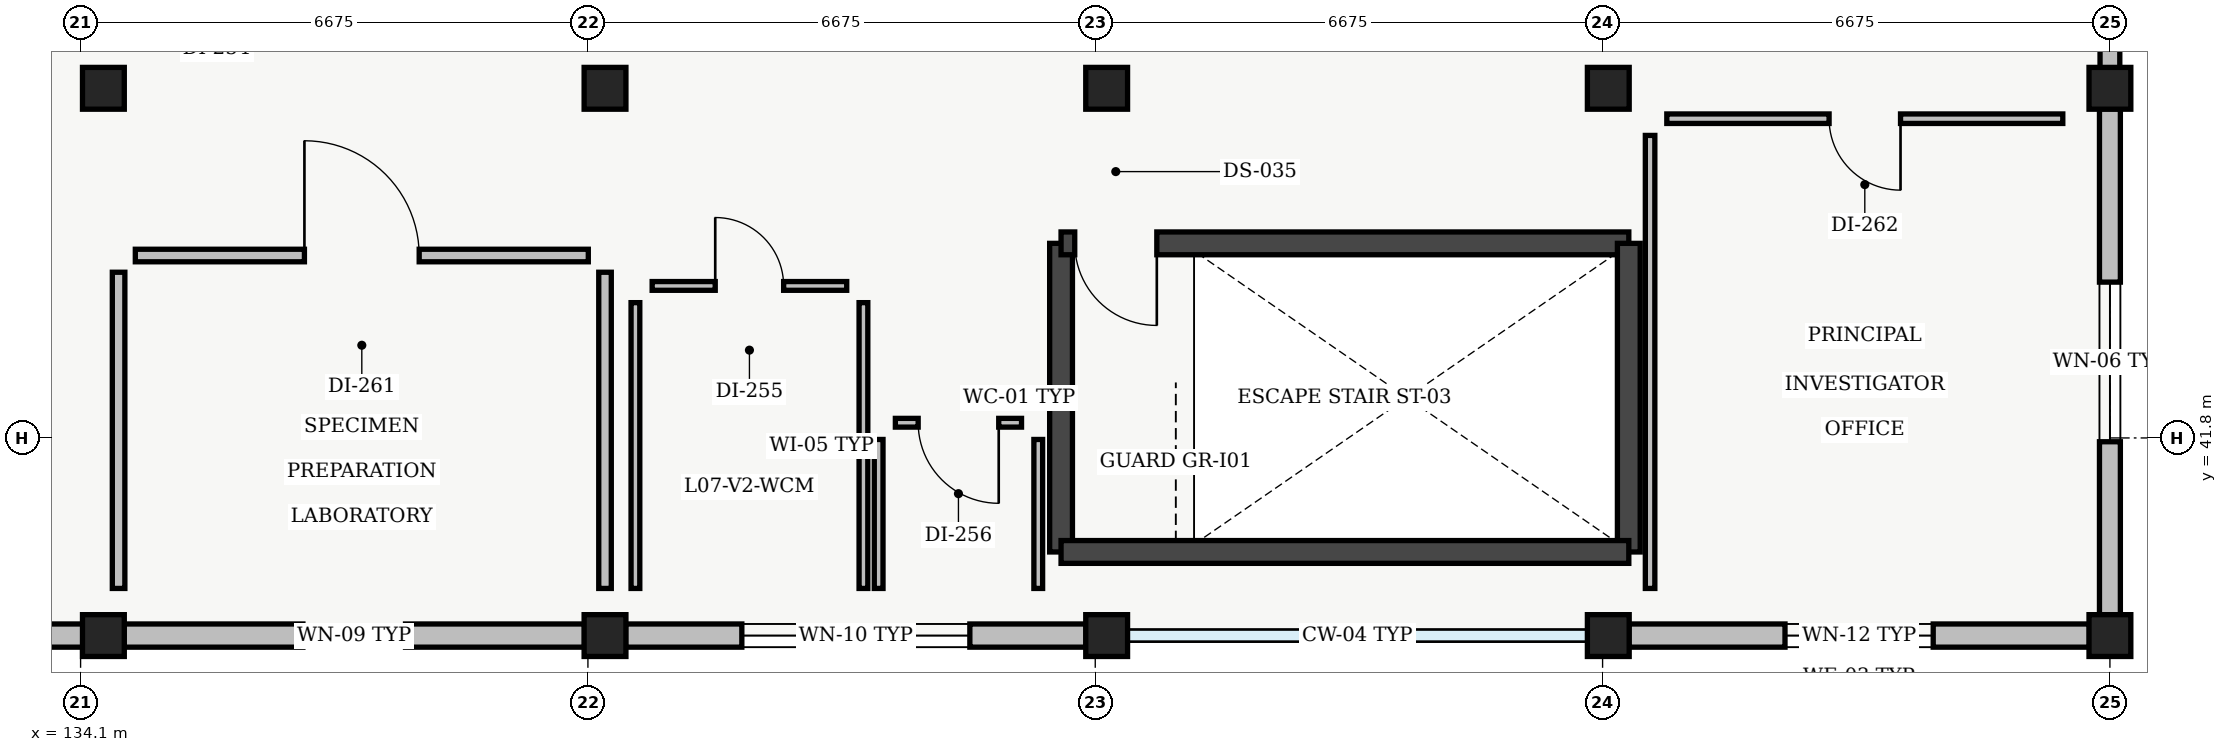
"""IFC4 building model, lengths in metres.
Left out: names, types, materials, properties, quantities, classifications, styles, units other than length and angle.
Written with IfcOpenShell. Run it as: python <this file> out.ifc"""

import sys

from ifc_helpers import new_model, si_unit, direction, frame, frame_2d, origin, origin_2d, place, context, subcontext, project, spatial, rectangle, extrude, element, fill, save


model = new_model("IFC4")
c1 = context("Model", 3, precision=1e-05, world=origin(), true_north=direction((0.0, 1.0)))
c2 = subcontext(c1, "Body", "Model", "MODEL_VIEW")
j1 = project(units=[si_unit("LENGTHUNIT", "METRE"), si_unit("PLANEANGLEUNIT", "RADIAN")], contexts=[c1])
p1 = place(None, origin())
s1 = spatial("IfcSite", under=j1, at=p1, CompositionType="ELEMENT")
p2 = place(p1, origin())
s2 = spatial("IfcBuilding", under=s1, at=p2, CompositionType="ELEMENT")
p3 = place(p2, frame((0.0, 0.0, 32.1)))
s3 = spatial("IfcBuildingStorey", under=s2, at=p3, CompositionType="ELEMENT", Elevation=32.1)
for number, where, z_axis, x_axis in (
    (1, (134.4, 39.2, 0.0), (0.0, 0.0, 1.0), (1.0, 0.0, 0.0)),
    (2, (134.4, 46.4, 0.0), (0.0, 0.0, 1.0), (1.0, 0.0, 0.0)),
    (3, (141.0, 39.2, 0.0), (0.0, 0.0, 1.0), (1.0, 0.0, 0.0)),
    (4, (141.0, 46.4, 0.0), (0.0, 0.0, 1.0), (1.0, 0.0, 0.0)),
    (5, (147.6, 39.2, 0.0), (0.0, 0.0, 1.0), (1.0, 0.0, 0.0)),
    (6, (147.6, 46.4, 0.0), (0.0, 0.0, 1.0), (1.0, 0.0, 0.0)),
    (7, (154.2, 39.2, 0.0), (0.0, 0.0, 1.0), (1.0, 0.0, 0.0)),
    (8, (154.2, 46.4, 0.0), (0.0, 0.0, 1.0), (1.0, 0.0, 0.0)),
    (9, (160.8, 39.2, 0.0), (0.0, 0.0, 1.0), (1.0, 0.0, 0.0)),
    (10, (160.8, 46.4, 0.0), (0.0, 0.0, 1.0), (1.0, 0.0, 0.0)),
):
    element("IfcColumn", number, at=place(p3, frame(where, z_axis=z_axis, x_axis=x_axis)), inside=s3, PredefinedType="COLUMN", context=c2, shape_type="SweptSolid", body=[
        extrude(rectangle(XDim=0.55, YDim=0.55, at=origin_2d()), origin(), (0.0, 0.0, 1.0), 4.305),
    ])
p4 = place(p3, frame((160.8, 53.33, 0.0), z_axis=(0.0, 0.0, 1.0), x_axis=(0.0, -1.0, 0.0)))
e11 = element("IfcWall", 11, at=p4, inside=s3, PredefinedType="STANDARD", context=c2, shape_type="SweptSolid", body=[
    extrude(rectangle(XDim=6.66, YDim=0.26, at=frame_2d((3.33, 0.0))), origin(), (0.0, 0.0, 1.0), 3.79),
])
p5 = place(p4, frame((1.98, 0.0, 0.95)))
e12 = element("IfcOpeningElement", 12, at=p5, cuts=e11, PredefinedType="OPENING", context=c2, shape_type="SweptSolid", body=[
    extrude(rectangle(XDim=2.7, YDim=1.8, at=frame_2d((1.35, 0.9))), frame((0.0, 0.13, 0.0), z_axis=(0.0, -1.0, 0.0), x_axis=(1.0, 0.0, 0.0)), (0.0, 0.0, 1.0), 0.26),
])
p6 = place(p3, frame((160.8, 46.13, 0.0), z_axis=(0.0, 0.0, 1.0), x_axis=(0.0, -1.0, 0.0)))
e13 = element("IfcWall", 13, at=p6, inside=s3, PredefinedType="STANDARD", context=c2, shape_type="SweptSolid", body=[
    extrude(rectangle(XDim=6.66, YDim=0.275, at=frame_2d((3.33, 0.0))), origin(), (0.0, 0.0, 1.0), 3.79),
])
p7 = place(p6, frame((2.28, 0.0, 0.95)))
e14 = element("IfcOpeningElement", 14, at=p7, cuts=e13, PredefinedType="OPENING", context=c2, shape_type="SweptSolid", body=[
    extrude(rectangle(XDim=2.1, YDim=1.8, at=frame_2d((1.05, 0.9))), frame((0.0, 0.137, 0.0), z_axis=(0.0, -1.0, 0.0), x_axis=(1.0, 0.0, 0.0)), (0.0, 0.0, 1.0), 0.275),
])
p8 = place(p3, frame((160.53, 39.2, 0.0), z_axis=(0.0, 0.0, 1.0), x_axis=(-1.0, 0.0, 0.0)))
e15 = element("IfcWall", 15, at=p8, inside=s3, PredefinedType="STANDARD", context=c2, shape_type="SweptSolid", body=[
    extrude(rectangle(XDim=6.06, YDim=0.305, at=frame_2d((3.03, 0.0))), origin(), (0.0, 0.0, 1.0), 3.79),
])
p9 = place(p8, frame((2.055, 0.0, 0.95)))
e16 = element("IfcOpeningElement", 16, at=p9, cuts=e15, PredefinedType="OPENING", context=c2, shape_type="SweptSolid", body=[
    extrude(rectangle(XDim=1.95, YDim=1.5, at=frame_2d((0.975, 0.75))), frame((0.0, 0.152, 0.0), z_axis=(0.0, -1.0, 0.0), x_axis=(1.0, 0.0, 0.0)), (0.0, 0.0, 1.0), 0.305),
])
p10 = place(p3, frame((147.33, 39.2, 0.0), z_axis=(0.0, 0.0, 1.0), x_axis=(-1.0, 0.0, 0.0)))
e17 = element("IfcWall", 17, at=p10, inside=s3, PredefinedType="STANDARD", context=c2, shape_type="SweptSolid", body=[
    extrude(rectangle(XDim=6.06, YDim=0.305, at=frame_2d((3.03, 0.0))), origin(), (0.0, 0.0, 1.0), 3.79),
])
p11 = place(p10, frame((1.53, 0.0, 0.95)))
e18 = element("IfcOpeningElement", 18, at=p11, cuts=e17, PredefinedType="OPENING", context=c2, shape_type="SweptSolid", body=[
    extrude(rectangle(XDim=3.0, YDim=1.65, at=frame_2d((1.5, 0.825))), frame((0.0, 0.152, 0.0), z_axis=(0.0, -1.0, 0.0), x_axis=(1.0, 0.0, 0.0)), (0.0, 0.0, 1.0), 0.305),
])
p12 = place(p3, frame((140.73, 39.2, 0.0), z_axis=(0.0, 0.0, 1.0), x_axis=(-1.0, 0.0, 0.0)))
e19 = element("IfcWall", 19, at=p12, inside=s3, PredefinedType="STANDARD", context=c2, shape_type="SweptSolid", body=[
    extrude(rectangle(XDim=6.06, YDim=0.305, at=frame_2d((3.03, 0.0))), origin(), (0.0, 0.0, 1.0), 3.79),
])
p13 = place(p12, frame((2.355, 0.0, 0.95)))
e20 = element("IfcOpeningElement", 20, at=p13, cuts=e19, PredefinedType="OPENING", context=c2, shape_type="SweptSolid", body=[
    extrude(rectangle(XDim=1.35, YDim=1.8, at=frame_2d((0.675, 0.9))), frame((0.0, 0.152, 0.0), z_axis=(0.0, -1.0, 0.0), x_axis=(1.0, 0.0, 0.0)), (0.0, 0.0, 1.0), 0.305),
])
p14 = place(p3, frame((134.13, 39.2, 0.0), z_axis=(0.0, 0.0, 1.0), x_axis=(-1.0, 0.0, 0.0)))
e21 = element("IfcWall", 21, at=p14, inside=s3, PredefinedType="STANDARD", context=c2, shape_type="SweptSolid", body=[
    extrude(rectangle(XDim=6.06, YDim=0.305, at=frame_2d((3.03, 0.0))), origin(), (0.0, 0.0, 1.0), 3.79),
])
p15 = place(p3, frame((147.0, 40.3, 0.0), z_axis=(0.0, 0.0, 1.0), x_axis=(0.0, 1.0, 0.0)))
e22 = element("IfcWall", 22, at=p15, inside=s3, PredefinedType="SHEAR", context=c2, shape_type="SweptSolid", body=[
    extrude(rectangle(XDim=4.06, YDim=0.3, at=frame_2d((2.03, 0.0))), origin(), (0.0, 0.0, 1.0), 4.28),
])
p16 = place(p3, frame((147.0, 44.36, 0.0), z_axis=(0.0, 0.0, 1.0), x_axis=(1.0, 0.0, 0.0)))
e23 = element("IfcWall", 23, at=p16, inside=s3, PredefinedType="SHEAR", context=c2, shape_type="SweptSolid", body=[
    extrude(rectangle(XDim=7.47, YDim=0.3, at=frame_2d((3.735, 0.0))), origin(), (0.0, 0.0, 1.0), 4.28),
])
p17 = place(p16, frame((0.18, 0.0, 0.0)))
e24 = element("IfcOpeningElement", 24, at=p17, cuts=e23, PredefinedType="OPENING", context=c2, shape_type="SweptSolid", body=[
    extrude(rectangle(XDim=1.08, YDim=2.15, at=frame_2d((0.54, 1.075))), frame((0.0, 0.15, 0.0), z_axis=(0.0, -1.0, 0.0), x_axis=(1.0, 0.0, 0.0)), (0.0, 0.0, 1.0), 0.3),
])
p18 = place(p3, frame((154.47, 44.36, 0.0), z_axis=(0.0, 0.0, 1.0), x_axis=(0.0, -1.0, 0.0)))
e25 = element("IfcWall", 25, at=p18, inside=s3, PredefinedType="SHEAR", context=c2, shape_type="SweptSolid", body=[
    extrude(rectangle(XDim=4.06, YDim=0.3, at=frame_2d((2.03, 0.0))), origin(), (0.0, 0.0, 1.0), 4.28),
])
p19 = place(p3, frame((154.47, 40.3, 0.0), z_axis=(0.0, 0.0, 1.0), x_axis=(-1.0, 0.0, 0.0)))
e26 = element("IfcWall", 26, at=p19, inside=s3, PredefinedType="SHEAR", context=c2, shape_type="SweptSolid", body=[
    extrude(rectangle(XDim=7.47, YDim=0.3, at=frame_2d((3.735, 0.0))), origin(), (0.0, 0.0, 1.0), 4.28),
])
p20 = place(p3, frame((144.4, 39.82, 0.0), z_axis=(0.0, 0.0, 1.0), x_axis=(0.0, 1.0, 0.0)))
e27 = element("IfcWall", 27, at=p20, inside=s3, PredefinedType="PARTITIONING", context=c2, shape_type="SweptSolid", body=[
    extrude(rectangle(XDim=3.76, YDim=0.115, at=frame_2d((1.88, 0.0))), origin(), (0.0, 0.0, 1.0), 3.95),
])
p21 = place(p3, frame((144.18, 43.8, 0.0), z_axis=(0.0, 0.0, 1.0), x_axis=(-1.0, 0.0, 0.0)))
e28 = element("IfcWall", 28, at=p21, inside=s3, PredefinedType="PARTITIONING", context=c2, shape_type="SweptSolid", body=[
    extrude(rectangle(XDim=2.56, YDim=0.115, at=frame_2d((1.28, 0.0))), origin(), (0.0, 0.0, 1.0), 3.95),
])
p22 = place(p21, frame((0.83, 0.0, 0.0)))
e29 = element("IfcOpeningElement", 29, at=p22, cuts=e28, PredefinedType="OPENING", context=c2, shape_type="SweptSolid", body=[
    extrude(rectangle(XDim=0.9, YDim=2.1, at=frame_2d((0.45, 1.05))), frame((0.0, 0.058, 0.0), z_axis=(0.0, -1.0, 0.0), x_axis=(1.0, 0.0, 0.0)), (0.0, 0.0, 1.0), 0.115),
])
p23 = place(p3, frame((141.4, 43.58, 0.0), z_axis=(0.0, 0.0, 1.0), x_axis=(0.0, -1.0, 0.0)))
e30 = element("IfcWall", 30, at=p23, inside=s3, PredefinedType="PARTITIONING", context=c2, shape_type="SweptSolid", body=[
    extrude(rectangle(XDim=3.76, YDim=0.115, at=frame_2d((1.88, 0.0))), origin(), (0.0, 0.0, 1.0), 3.95),
])
p24 = place(p3, frame((146.7, 39.82, 0.0), z_axis=(0.0, 0.0, 1.0), x_axis=(0.0, 1.0, 0.0)))
e31 = element("IfcWall", 31, at=p24, inside=s3, PredefinedType="PARTITIONING", context=c2, shape_type="SweptSolid", body=[
    extrude(rectangle(XDim=1.96, YDim=0.115, at=frame_2d((0.98, 0.0))), origin(), (0.0, 0.0, 1.0), 3.95),
])
p25 = place(p3, frame((146.48, 42.0, 0.0), z_axis=(0.0, 0.0, 1.0), x_axis=(-1.0, 0.0, 0.0)))
e32 = element("IfcWall", 32, at=p25, inside=s3, PredefinedType="PARTITIONING", context=c2, shape_type="SweptSolid", body=[
    extrude(rectangle(XDim=1.66, YDim=0.115, at=frame_2d((0.83, 0.0))), origin(), (0.0, 0.0, 1.0), 3.95),
])
p26 = place(p25, frame((0.3, 0.0, 0.0)))
e33 = element("IfcOpeningElement", 33, at=p26, cuts=e32, PredefinedType="OPENING", context=c2, shape_type="SweptSolid", body=[
    extrude(rectangle(XDim=1.06, YDim=2.12, at=frame_2d((0.53, 1.06))), frame((0.0, 0.058, 0.0), z_axis=(0.0, -1.0, 0.0), x_axis=(1.0, 0.0, 0.0)), (0.0, 0.0, 1.0), 0.115),
])
p27 = place(p3, frame((144.6, 41.78, 0.0), z_axis=(0.0, 0.0, 1.0), x_axis=(0.0, -1.0, 0.0)))
e34 = element("IfcWall", 34, at=p27, inside=s3, PredefinedType="PARTITIONING", context=c2, shape_type="SweptSolid", body=[
    extrude(rectangle(XDim=1.96, YDim=0.115, at=frame_2d((0.98, 0.0))), origin(), (0.0, 0.0, 1.0), 3.95),
])
p28 = place(p3, frame((141.0, 39.82, 0.0), z_axis=(0.0, 0.0, 1.0), x_axis=(0.0, 1.0, 0.0)))
e35 = element("IfcWall", 35, at=p28, inside=s3, PredefinedType="PARTITIONING", context=c2, shape_type="SweptSolid", body=[
    extrude(rectangle(XDim=4.16, YDim=0.165, at=frame_2d((2.08, 0.0))), origin(), (0.0, 0.0, 1.0), 3.74),
])
p29 = place(p3, frame((140.78, 44.2, 0.0), z_axis=(0.0, 0.0, 1.0), x_axis=(-1.0, 0.0, 0.0)))
e36 = element("IfcWall", 36, at=p29, inside=s3, PredefinedType="PARTITIONING", context=c2, shape_type="SweptSolid", body=[
    extrude(rectangle(XDim=5.96, YDim=0.165, at=frame_2d((2.98, 0.0))), origin(), (0.0, 0.0, 1.0), 3.95),
])
p30 = place(p29, frame((2.225, 0.0, 0.0)))
e37 = element("IfcOpeningElement", 37, at=p30, cuts=e36, PredefinedType="OPENING", context=c2, shape_type="SweptSolid", body=[
    extrude(rectangle(XDim=1.51, YDim=2.12, at=frame_2d((0.755, 1.06))), frame((0.0, 0.083, 0.0), z_axis=(0.0, -1.0, 0.0), x_axis=(1.0, 0.0, 0.0)), (0.0, 0.0, 1.0), 0.165),
])
p31 = place(p3, frame((134.6, 43.98, 0.0), z_axis=(0.0, 0.0, 1.0), x_axis=(0.0, -1.0, 0.0)))
e38 = element("IfcWall", 38, at=p31, inside=s3, PredefinedType="PARTITIONING", context=c2, shape_type="SweptSolid", body=[
    extrude(rectangle(XDim=4.16, YDim=0.165, at=frame_2d((2.08, 0.0))), origin(), (0.0, 0.0, 1.0), 3.74),
])
p32 = place(p3, frame((160.18, 46.0, 0.0), z_axis=(0.0, 0.0, 1.0), x_axis=(-1.0, 0.0, 0.0)))
e39 = element("IfcWall", 39, at=p32, inside=s3, PredefinedType="PARTITIONING", context=c2, shape_type="SweptSolid", body=[
    extrude(rectangle(XDim=5.21, YDim=0.125, at=frame_2d((2.605, 0.0))), origin(), (0.0, 0.0, 1.0), 3.95),
])
p33 = place(p32, frame((2.135, 0.0, 0.0)))
e40 = element("IfcOpeningElement", 40, at=p33, cuts=e39, PredefinedType="OPENING", context=c2, shape_type="SweptSolid", body=[
    extrude(rectangle(XDim=0.94, YDim=2.12, at=frame_2d((0.47, 1.06))), frame((0.0, 0.062, 0.0), z_axis=(0.0, -1.0, 0.0), x_axis=(1.0, 0.0, 0.0)), (0.0, 0.0, 1.0), 0.125),
])
p34 = place(p3, frame((154.75, 45.78, 0.0), z_axis=(0.0, 0.0, 1.0), x_axis=(0.0, -1.0, 0.0)))
e41 = element("IfcWall", 41, at=p34, inside=s3, PredefinedType="PARTITIONING", context=c2, shape_type="SweptSolid", body=[
    extrude(rectangle(XDim=5.96, YDim=0.125, at=frame_2d((2.98, 0.0))), origin(), (0.0, 0.0, 1.0), 3.95),
])
p35 = place(p7, origin())
e42 = element("IfcWindow", 42, at=p35, inside=s3, PartitioningType="SINGLE_PANEL", PredefinedType="WINDOW", context=c2, shape_type="SweptSolid", body=[
    extrude(rectangle(XDim=2.1, YDim=1.8, at=frame_2d((1.05, 0.9))), frame((0.0, 0.03, 0.0), z_axis=(0.0, -1.0, 0.0), x_axis=(1.0, 0.0, 0.0)), (0.0, 0.0, 1.0), 0.06),
])
fill(e14, e42)
p36 = place(p9, origin())
e43 = element("IfcWindow", 43, at=p36, inside=s3, PartitioningType="SINGLE_PANEL", PredefinedType="WINDOW", context=c2, shape_type="SweptSolid", body=[
    extrude(rectangle(XDim=1.95, YDim=1.5, at=frame_2d((0.975, 0.75))), frame((0.0, 0.03, 0.0), z_axis=(0.0, -1.0, 0.0), x_axis=(1.0, 0.0, 0.0)), (0.0, 0.0, 1.0), 0.06),
])
fill(e16, e43)
p37 = place(p11, origin())
e44 = element("IfcWindow", 44, at=p37, inside=s3, PartitioningType="SINGLE_PANEL", PredefinedType="WINDOW", context=c2, shape_type="SweptSolid", body=[
    extrude(rectangle(XDim=3.0, YDim=1.65, at=frame_2d((1.5, 0.825))), frame((0.0, 0.03, 0.0), z_axis=(0.0, -1.0, 0.0), x_axis=(1.0, 0.0, 0.0)), (0.0, 0.0, 1.0), 0.06),
])
fill(e18, e44)
p38 = place(p13, origin())
e45 = element("IfcWindow", 45, at=p38, inside=s3, PartitioningType="SINGLE_PANEL", PredefinedType="WINDOW", context=c2, shape_type="SweptSolid", body=[
    extrude(rectangle(XDim=1.35, YDim=1.8, at=frame_2d((0.675, 0.9))), frame((0.0, 0.03, 0.0), z_axis=(0.0, -1.0, 0.0), x_axis=(1.0, 0.0, 0.0)), (0.0, 0.0, 1.0), 0.06),
])
fill(e20, e45)
p39 = place(p17, origin())
e46 = element("IfcDoor", 46, at=p39, inside=s3, OperationType="SINGLE_SWING_RIGHT", PredefinedType="DOOR", context=c2, shape_type="SweptSolid", body=[
    extrude(rectangle(XDim=1.08, YDim=2.15, at=frame_2d((0.54, 1.075))), frame((0.0, 0.025, 0.0), z_axis=(0.0, -1.0, 0.0), x_axis=(1.0, 0.0, 0.0)), (0.0, 0.0, 1.0), 0.05),
])
fill(e24, e46)
p40 = place(p22, origin())
e47 = element("IfcDoor", 47, at=p40, inside=s3, OperationType="SINGLE_SWING_RIGHT", PredefinedType="DOOR", context=c2, shape_type="SweptSolid", body=[
    extrude(rectangle(XDim=0.9, YDim=2.1, at=frame_2d((0.45, 1.05))), frame((0.0, 0.025, 0.0), z_axis=(0.0, -1.0, 0.0), x_axis=(1.0, 0.0, 0.0)), (0.0, 0.0, 1.0), 0.05),
])
fill(e29, e47)
p41 = place(p26, origin())
e48 = element("IfcDoor", 48, at=p41, inside=s3, OperationType="SINGLE_SWING_LEFT", PredefinedType="DOOR", context=c2, shape_type="SweptSolid", body=[
    extrude(rectangle(XDim=1.06, YDim=2.12, at=frame_2d((0.53, 1.06))), frame((0.0, 0.025, 0.0), z_axis=(0.0, -1.0, 0.0), x_axis=(1.0, 0.0, 0.0)), (0.0, 0.0, 1.0), 0.05),
])
fill(e33, e48)
p42 = place(p30, origin())
e49 = element("IfcDoor", 49, at=p42, inside=s3, OperationType="SINGLE_SWING_RIGHT", PredefinedType="DOOR", context=c2, shape_type="SweptSolid", body=[
    extrude(rectangle(XDim=1.51, YDim=2.12, at=frame_2d((0.755, 1.06))), frame((0.0, 0.025, 0.0), z_axis=(0.0, -1.0, 0.0), x_axis=(1.0, 0.0, 0.0)), (0.0, 0.0, 1.0), 0.05),
])
fill(e37, e49)
p43 = place(p33, origin())
e50 = element("IfcDoor", 50, at=p43, inside=s3, OperationType="SINGLE_SWING_LEFT", PredefinedType="DOOR", context=c2, shape_type="SweptSolid", body=[
    extrude(rectangle(XDim=0.94, YDim=2.12, at=frame_2d((0.47, 1.06))), frame((0.0, 0.025, 0.0), z_axis=(0.0, -1.0, 0.0), x_axis=(1.0, 0.0, 0.0)), (0.0, 0.0, 1.0), 0.05),
])
fill(e40, e50)
save(model, sys.argv[1])
